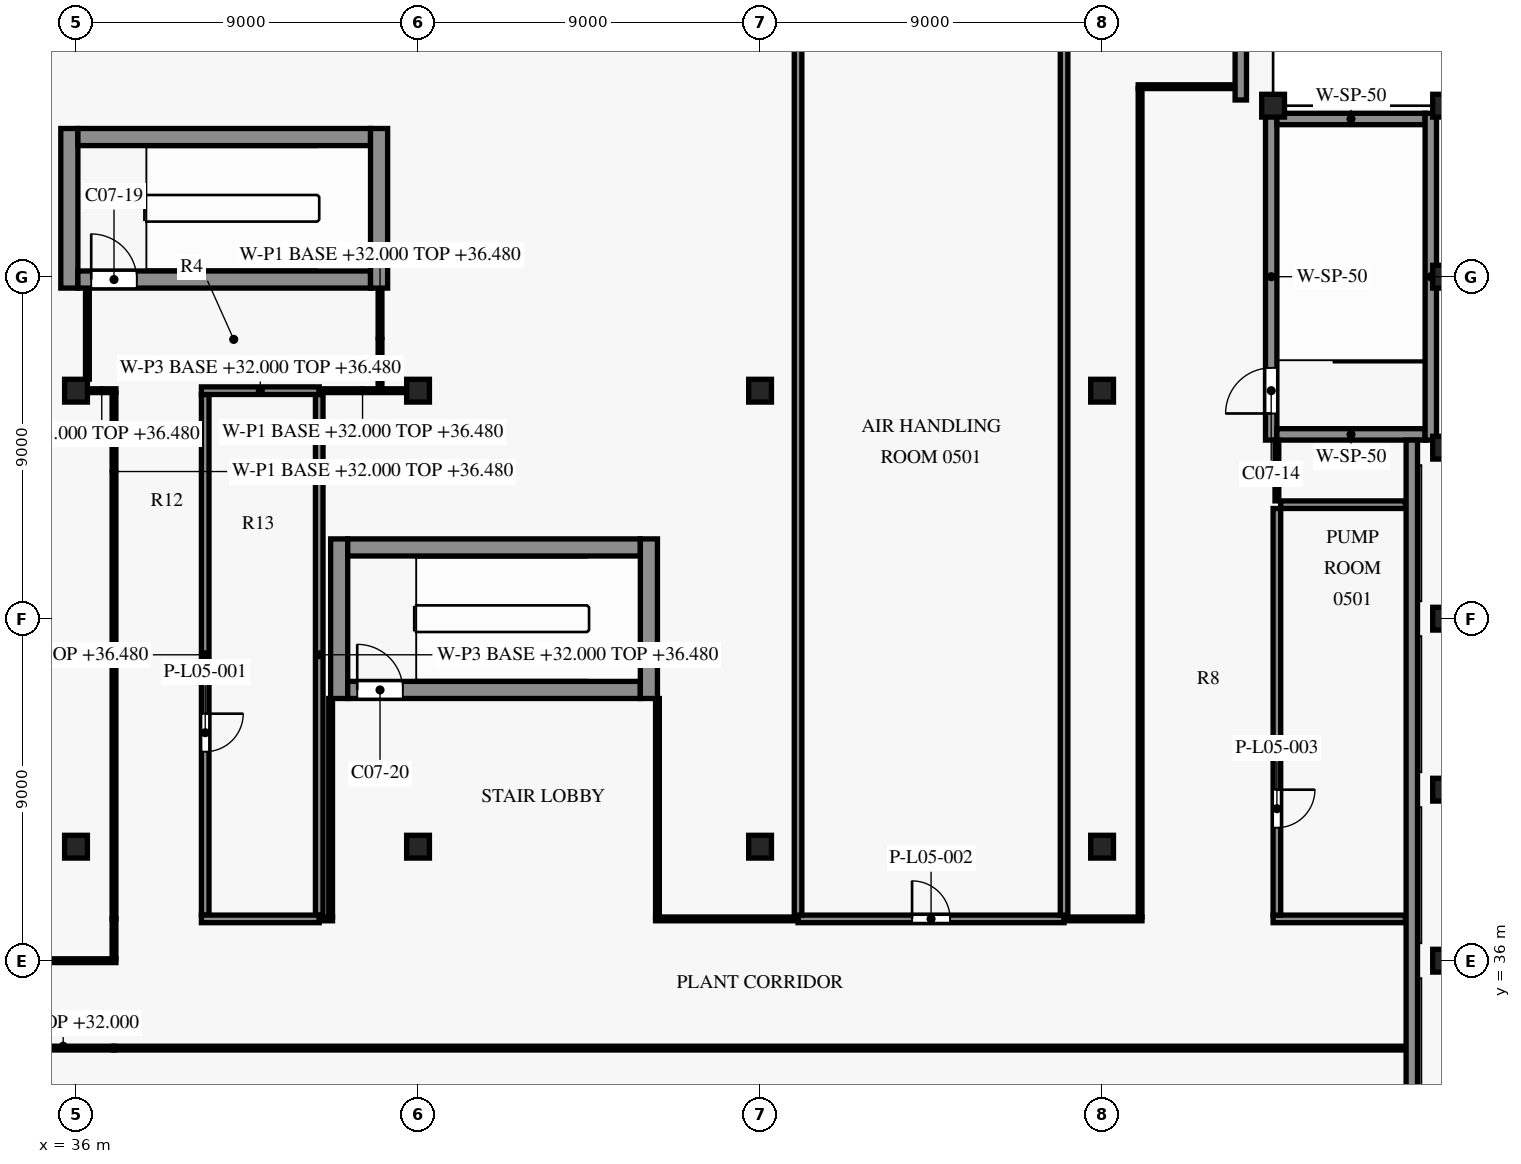
"""IFC4 building model, lengths in metres.
Left out: names, types, materials, properties, quantities, classifications, styles, units other than length and angle.
Written with IfcOpenShell. Run it as: python <this file> out.ifc"""

import sys

from ifc_helpers import new_model, si_unit, direction, frame, frame_2d, origin, origin_2d, place, context, subcontext, project, spatial, rectangle, hollow_rectangle, extrude, element, fill, save


model = new_model("IFC4")
c1 = context("Model", 3, precision=1e-05, world=origin(), true_north=direction((0.0, 1.0)))
c2 = subcontext(c1, "Body", "Model", "MODEL_VIEW")
j1 = project(units=[si_unit("LENGTHUNIT", "METRE"), si_unit("PLANEANGLEUNIT", "RADIAN")], contexts=[c1])
p1 = place(None, origin())
s1 = spatial("IfcSite", under=j1, at=p1, CompositionType="ELEMENT")
p2 = place(p1, origin())
s2 = spatial("IfcBuilding", under=s1, at=p2, CompositionType="ELEMENT")
p3 = place(p2, frame((0.0, 0.0, 32.0)))
s3 = spatial("IfcBuildingStorey", under=s2, at=p3, CompositionType="ELEMENT", Elevation=32.0)
for number, where, z_axis, x_axis in (
    (1, (36.0, 39.0, 0.0), (0.0, 0.0, 1.0), (1.0, 0.0, 0.0)),
    (2, (36.0, 51.0, 0.0), (0.0, 0.0, 1.0), (1.0, 0.0, 0.0)),
    (3, (45.0, 39.0, 0.0), (0.0, 0.0, 1.0), (1.0, 0.0, 0.0)),
    (4, (45.0, 51.0, 0.0), (0.0, 0.0, 1.0), (1.0, 0.0, 0.0)),
    (5, (54.0, 39.0, 0.0), (0.0, 0.0, 1.0), (1.0, 0.0, 0.0)),
    (6, (54.0, 51.0, 0.0), (0.0, 0.0, 1.0), (1.0, 0.0, 0.0)),
    (7, (63.0, 39.0, 0.0), (0.0, 0.0, 1.0), (1.0, 0.0, 0.0)),
    (8, (63.0, 51.0, 0.0), (0.0, 0.0, 1.0), (1.0, 0.0, 0.0)),
    (9, (67.5, 58.5, 0.0), (0.0, 0.0, 1.0), (1.0, 0.0, 0.0)),
    (10, (72.0, 36.0, 0.0), (0.0, 0.0, 1.0), (1.0, 0.0, 0.0)),
    (11, (72.0, 40.5, 0.0), (0.0, 0.0, 1.0), (1.0, 0.0, 0.0)),
    (12, (72.0, 45.0, 0.0), (0.0, 0.0, 1.0), (1.0, 0.0, 0.0)),
    (13, (72.0, 49.5, 0.0), (0.0, 0.0, 1.0), (1.0, 0.0, 0.0)),
    (14, (72.0, 54.0, 0.0), (0.0, 0.0, 1.0), (1.0, 0.0, 0.0)),
    (15, (72.0, 58.5, 0.0), (0.0, 0.0, 1.0), (1.0, 0.0, 0.0)),
):
    element("IfcColumn", number, at=place(p3, frame(where, z_axis=z_axis, x_axis=x_axis)), inside=s3, PredefinedType="COLUMN", context=c2, shape_type="SweptSolid", body=[
        extrude(hollow_rectangle(XDim=0.6, YDim=0.6, WallThickness=0.03, InnerFilletRadius=0.03, OuterFilletRadius=0.06, at=origin_2d()), origin(), (0.0, 0.0, 1.0), 5.5),
    ])
p4 = place(p3, frame((71.15, 49.7, 0.0), z_axis=(0.0, 0.0, 1.0), x_axis=(0.0, -1.0, 0.0)))
e16 = element("IfcWall", 16, at=p4, inside=s3, PredefinedType="SOLIDWALL", context=c2, shape_type="SweptSolid", body=[
    extrude(rectangle(XDim=17.202, YDim=0.3, at=frame_2d((8.601, 0.0))), origin(), (0.0, 0.0, 1.0), 4.85),
])
p5 = place(p3, frame((66.65, 62.816, 0.0), z_axis=(0.0, 0.0, 1.0), x_axis=(0.0, -1.0, 0.0)))
e17 = element("IfcWall", 17, at=p5, inside=s3, PredefinedType="SOLIDWALL", context=c2, shape_type="SweptSolid", body=[
    extrude(rectangle(XDim=4.167, YDim=0.3, at=frame_2d((2.083, 0.0))), origin(), (0.0, 0.0, 1.0), 4.85),
])
p6 = place(p3, frame((43.15, 43.125, 0.0), z_axis=(0.0, 0.0, 1.0), x_axis=(1.0, 0.0, 0.0)))
e18 = element("IfcWall", 18, at=p6, inside=s3, PredefinedType="SHEAR", context=c2, shape_type="SweptSolid", body=[
    extrude(rectangle(XDim=7.7, YDim=0.45, at=frame_2d((3.85, 0.0))), origin(), (0.0, 0.0, 1.0), 5.2),
])
p7 = place(p6, frame((0.25, 0.0, 0.0)))
e19 = element("IfcOpeningElement", 19, at=p7, cuts=e18, PredefinedType="OPENING", context=c2, shape_type="SweptSolid", body=[
    extrude(rectangle(XDim=1.2, YDim=2.2, at=frame_2d((0.6, 1.1))), frame((0.0, 0.235, 0.0), z_axis=(0.0, -1.0, 0.0), x_axis=(1.0, 0.0, 0.0)), (0.0, 0.0, 1.0), 0.47),
])
p8 = place(p3, frame((43.15, 46.875, 0.0), z_axis=(0.0, 0.0, 1.0), x_axis=(1.0, 0.0, 0.0)))
e20 = element("IfcWall", 20, at=p8, inside=s3, PredefinedType="SHEAR", context=c2, shape_type="SweptSolid", body=[
    extrude(rectangle(XDim=7.7, YDim=0.45, at=frame_2d((3.85, 0.0))), origin(), (0.0, 0.0, 1.0), 5.2),
])
p9 = place(p3, frame((67.6, 49.85, 0.0), z_axis=(0.0, 0.0, 1.0), x_axis=(1.0, 0.0, 0.0)))
e21 = element("IfcWall", 21, at=p9, inside=s3, PredefinedType="SHEAR", context=c2, shape_type="SweptSolid", body=[
    extrude(rectangle(XDim=3.9, YDim=0.3, at=frame_2d((1.95, 0.0))), origin(), (0.0, 0.0, 1.0), 5.2),
])
p10 = place(p3, frame((36.05, 53.925, 0.0), z_axis=(0.0, 0.0, 1.0), x_axis=(1.0, 0.0, 0.0)))
e22 = element("IfcWall", 22, at=p10, inside=s3, PredefinedType="SHEAR", context=c2, shape_type="SweptSolid", body=[
    extrude(rectangle(XDim=7.7, YDim=0.45, at=frame_2d((3.85, 0.0))), origin(), (0.0, 0.0, 1.0), 5.2),
])
p11 = place(p10, frame((0.35, 0.0, 0.0)))
e23 = element("IfcOpeningElement", 23, at=p11, cuts=e22, PredefinedType="OPENING", context=c2, shape_type="SweptSolid", body=[
    extrude(rectangle(XDim=1.2, YDim=2.2, at=frame_2d((0.6, 1.1))), frame((0.0, 0.235, 0.0), z_axis=(0.0, -1.0, 0.0), x_axis=(1.0, 0.0, 0.0)), (0.0, 0.0, 1.0), 0.47),
])
p12 = place(p3, frame((36.05, 57.675, 0.0), z_axis=(0.0, 0.0, 1.0), x_axis=(1.0, 0.0, 0.0)))
e24 = element("IfcWall", 24, at=p12, inside=s3, PredefinedType="SHEAR", context=c2, shape_type="SweptSolid", body=[
    extrude(rectangle(XDim=7.7, YDim=0.45, at=frame_2d((3.85, 0.0))), origin(), (0.0, 0.0, 1.0), 5.2),
])
p13 = place(p3, frame((67.6, 58.15, 0.0), z_axis=(0.0, 0.0, 1.0), x_axis=(1.0, 0.0, 0.0)))
e25 = element("IfcWall", 25, at=p13, inside=s3, PredefinedType="SHEAR", context=c2, shape_type="SweptSolid", body=[
    extrude(rectangle(XDim=3.9, YDim=0.3, at=frame_2d((1.95, 0.0))), origin(), (0.0, 0.0, 1.0), 5.2),
])
p14 = place(p3, frame((35.825, 53.7, 0.0), z_axis=(0.0, 0.0, 1.0), x_axis=(0.0, 1.0, 0.0)))
e26 = element("IfcWall", 26, at=p14, inside=s3, PredefinedType="SHEAR", context=c2, shape_type="SweptSolid", body=[
    extrude(rectangle(XDim=4.2, YDim=0.45, at=frame_2d((2.1, 0.0))), origin(), (0.0, 0.0, 1.0), 5.2),
])
p15 = place(p3, frame((42.925, 42.9, 0.0), z_axis=(0.0, 0.0, 1.0), x_axis=(0.0, 1.0, 0.0)))
e27 = element("IfcWall", 27, at=p15, inside=s3, PredefinedType="SHEAR", context=c2, shape_type="SweptSolid", body=[
    extrude(rectangle(XDim=4.2, YDim=0.45, at=frame_2d((2.1, 0.0))), origin(), (0.0, 0.0, 1.0), 5.2),
])
p16 = place(p3, frame((43.975, 53.7, 0.0), z_axis=(0.0, 0.0, 1.0), x_axis=(0.0, 1.0, 0.0)))
e28 = element("IfcWall", 28, at=p16, inside=s3, PredefinedType="SHEAR", context=c2, shape_type="SweptSolid", body=[
    extrude(rectangle(XDim=4.2, YDim=0.45, at=frame_2d((2.1, 0.0))), origin(), (0.0, 0.0, 1.0), 5.2),
])
p17 = place(p3, frame((51.075, 42.9, 0.0), z_axis=(0.0, 0.0, 1.0), x_axis=(0.0, 1.0, 0.0)))
e29 = element("IfcWall", 29, at=p17, inside=s3, PredefinedType="SHEAR", context=c2, shape_type="SweptSolid", body=[
    extrude(rectangle(XDim=4.2, YDim=0.45, at=frame_2d((2.1, 0.0))), origin(), (0.0, 0.0, 1.0), 5.2),
])
p18 = place(p3, frame((67.45, 49.7, 0.0), z_axis=(0.0, 0.0, 1.0), x_axis=(0.0, 1.0, 0.0)))
e30 = element("IfcWall", 30, at=p18, inside=s3, PredefinedType="SHEAR", context=c2, shape_type="SweptSolid", body=[
    extrude(rectangle(XDim=8.6, YDim=0.3, at=frame_2d((4.3, 0.0))), origin(), (0.0, 0.0, 1.0), 5.2),
])
p19 = place(p18, frame((0.7, 0.0, 0.0)))
e31 = element("IfcOpeningElement", 31, at=p19, cuts=e30, PredefinedType="OPENING", context=c2, shape_type="SweptSolid", body=[
    extrude(rectangle(XDim=1.2, YDim=2.2, at=frame_2d((0.6, 1.1))), frame((0.0, 0.16, 0.0), z_axis=(0.0, -1.0, 0.0), x_axis=(1.0, 0.0, 0.0)), (0.0, 0.0, 1.0), 0.32),
])
p20 = place(p3, frame((71.65, 49.7, 0.0), z_axis=(0.0, 0.0, 1.0), x_axis=(0.0, 1.0, 0.0)))
e32 = element("IfcWall", 32, at=p20, inside=s3, PredefinedType="SHEAR", context=c2, shape_type="SweptSolid", body=[
    extrude(rectangle(XDim=8.6, YDim=0.3, at=frame_2d((4.3, 0.0))), origin(), (0.0, 0.0, 1.0), 5.2),
])
p21 = place(p3, frame((37.0, 33.7, 0.0), z_axis=(0.0, 0.0, 1.0), x_axis=(-1.0, 0.0, 0.0)))
e33 = element("IfcWall", 33, at=p21, inside=s3, PredefinedType="PARTITIONING", context=c2, shape_type="SweptSolid", body=[
    extrude(rectangle(XDim=35.05, YDim=0.1, at=frame_2d((17.525, 0.0))), origin(), (0.0, 0.0, 1.0), 5.18),
])
p22 = place(p3, frame((70.98, 33.7, 0.0), z_axis=(0.0, 0.0, 1.0), x_axis=(-1.0, 0.0, 0.0)))
e34 = element("IfcWall", 34, at=p22, inside=s3, PredefinedType="PARTITIONING", context=c2, shape_type="SweptSolid", body=[
    extrude(rectangle(XDim=33.98, YDim=0.1, at=frame_2d((16.99, 0.0))), origin(), (0.0, 0.0, 1.0), 5.18),
])
p23 = place(p3, frame((27.15, 36.0, 0.0), z_axis=(0.0, 0.0, 1.0), x_axis=(1.0, 0.0, 0.0)))
e35 = element("IfcWall", 35, at=p23, inside=s3, PredefinedType="PARTITIONING", context=c2, shape_type="SweptSolid", body=[
    extrude(rectangle(XDim=9.9, YDim=0.1, at=frame_2d((4.95, 0.0))), origin(), (0.0, 0.0, 1.0), 5.18),
])
p24 = place(p3, frame((37.0, 36.05, 0.0), z_axis=(0.0, 0.0, 1.0), x_axis=(0.0, 1.0, 0.0)))
e36 = element("IfcWall", 36, at=p24, inside=s3, PredefinedType="PARTITIONING", context=c2, shape_type="SweptSolid", body=[
    extrude(rectangle(XDim=1.05, YDim=0.1, at=frame_2d((0.525, 0.0))), origin(), (0.0, 0.0, 1.0), 5.18),
])
p25 = place(p3, frame((37.0, 37.1, 0.0), z_axis=(0.0, 0.0, 1.0), x_axis=(0.0, 1.0, 0.0)))
e37 = element("IfcWall", 37, at=p25, inside=s3, PredefinedType="PARTITIONING", context=c2, shape_type="SweptSolid", body=[
    extrude(rectangle(XDim=13.85, YDim=0.1, at=frame_2d((6.925, 0.0))), origin(), (0.0, 0.0, 1.0), 4.48),
])
p26 = place(p3, frame((39.3, 37.1, 0.0), z_axis=(0.0, 0.0, 1.0), x_axis=(1.0, 0.0, 0.0)))
e38 = element("IfcWall", 38, at=p26, inside=s3, PredefinedType="PARTITIONING", context=c2, shape_type="SweptSolid", body=[
    extrude(rectangle(XDim=3.1, YDim=0.2, at=frame_2d((1.55, 0.0))), origin(), (0.0, 0.0, 1.0), 5.18),
])
p27 = place(p3, frame((42.4, 37.1, 0.0), z_axis=(0.0, 0.0, 1.0), x_axis=(1.0, 0.0, 0.0)))
e39 = element("IfcWall", 39, at=p27, inside=s3, PredefinedType="PARTITIONING", context=c2, shape_type="SweptSolid", body=[
    extrude(rectangle(XDim=0.35, YDim=0.1, at=frame_2d((0.175, 0.0))), origin(), (0.0, 0.0, 1.0), 5.18),
])
p28 = place(p3, frame((51.25, 37.1, 0.0), z_axis=(0.0, 0.0, 1.0), x_axis=(1.0, 0.0, 0.0)))
e40 = element("IfcWall", 40, at=p28, inside=s3, PredefinedType="PARTITIONING", context=c2, shape_type="SweptSolid", body=[
    extrude(rectangle(XDim=3.75, YDim=0.1, at=frame_2d((1.875, 0.0))), origin(), (0.0, 0.0, 1.0), 5.18),
])
p29 = place(p3, frame((55.0, 37.1, 0.0), z_axis=(0.0, 0.0, 1.0), x_axis=(1.0, 0.0, 0.0)))
e41 = element("IfcWall", 41, at=p29, inside=s3, PredefinedType="PARTITIONING", context=c2, shape_type="SweptSolid", body=[
    extrude(rectangle(XDim=7.0, YDim=0.2, at=frame_2d((3.5, 0.0))), origin(), (0.0, 0.0, 1.0), 5.18),
])
p30 = place(p29, frame((3.0, 0.0, 0.0)))
e42 = element("IfcOpeningElement", 42, at=p30, cuts=e41, PredefinedType="OPENING", context=c2, shape_type="SweptSolid", body=[
    extrude(rectangle(XDim=1.0, YDim=2.1, at=frame_2d((0.5, 1.05))), frame((0.0, 0.11, 0.0), z_axis=(0.0, -1.0, 0.0), x_axis=(1.0, 0.0, 0.0)), (0.0, 0.0, 1.0), 0.22),
])
p31 = place(p3, frame((62.0, 37.1, 0.0), z_axis=(0.0, 0.0, 1.0), x_axis=(1.0, 0.0, 0.0)))
e43 = element("IfcWall", 43, at=p31, inside=s3, PredefinedType="PARTITIONING", context=c2, shape_type="SweptSolid", body=[
    extrude(rectangle(XDim=2.05, YDim=0.1, at=frame_2d((1.025, 0.0))), origin(), (0.0, 0.0, 1.0), 5.18),
])
p32 = place(p3, frame((67.5, 37.1, 0.0), z_axis=(0.0, 0.0, 1.0), x_axis=(1.0, 0.0, 0.0)))
e44 = element("IfcWall", 44, at=p32, inside=s3, PredefinedType="PARTITIONING", context=c2, shape_type="SweptSolid", body=[
    extrude(rectangle(XDim=3.48, YDim=0.2, at=frame_2d((1.74, 0.0))), origin(), (0.0, 0.0, 1.0), 5.18),
])
p33 = place(p3, frame((42.7, 37.15, 0.0), z_axis=(0.0, 0.0, 1.0), x_axis=(0.0, 1.0, 0.0)))
e45 = element("IfcWall", 45, at=p33, inside=s3, PredefinedType="PARTITIONING", context=c2, shape_type="SweptSolid", body=[
    extrude(rectangle(XDim=5.75, YDim=0.1, at=frame_2d((2.875, 0.0))), origin(), (0.0, 0.0, 1.0), 5.18),
])
p34 = place(p3, frame((64.0, 37.15, 0.0), z_axis=(0.0, 0.0, 1.0), x_axis=(0.0, 1.0, 0.0)))
e46 = element("IfcWall", 46, at=p34, inside=s3, PredefinedType="PARTITIONING", context=c2, shape_type="SweptSolid", body=[
    extrude(rectangle(XDim=21.8, YDim=0.1, at=frame_2d((10.9, 0.0))), origin(), (0.0, 0.0, 1.0), 5.18),
])
p35 = place(p3, frame((55.0, 37.2, 0.0), z_axis=(0.0, 0.0, 1.0), x_axis=(0.0, 1.0, 0.0)))
e47 = element("IfcWall", 47, at=p35, inside=s3, PredefinedType="PARTITIONING", context=c2, shape_type="SweptSolid", body=[
    extrude(rectangle(XDim=24.875, YDim=0.2, at=frame_2d((12.438, 0.0))), origin(), (0.0, 0.0, 1.0), 5.18),
])
p36 = place(p3, frame((51.3, 42.9, 0.0), z_axis=(0.0, 0.0, 1.0), x_axis=(0.0, -1.0, 0.0)))
e48 = element("IfcWall", 48, at=p36, inside=s3, PredefinedType="PARTITIONING", context=c2, shape_type="SweptSolid", body=[
    extrude(rectangle(XDim=5.75, YDim=0.1, at=frame_2d((2.875, 0.0))), origin(), (0.0, 0.0, 1.0), 5.18),
])
p37 = place(p3, frame((67.6, 47.9, 0.0), z_axis=(0.0, 0.0, 1.0), x_axis=(0.0, -1.0, 0.0)))
e49 = element("IfcWall", 49, at=p37, inside=s3, PredefinedType="PARTITIONING", context=c2, shape_type="SweptSolid", body=[
    extrude(rectangle(XDim=10.7, YDim=0.2, at=frame_2d((5.35, 0.0))), origin(), (0.0, 0.0, 1.0), 5.18),
])
p38 = place(p37, frame((7.4, 0.0, 0.0)))
e50 = element("IfcOpeningElement", 50, at=p38, cuts=e49, PredefinedType="OPENING", context=c2, shape_type="SweptSolid", body=[
    extrude(rectangle(XDim=1.0, YDim=2.1, at=frame_2d((0.5, 1.05))), frame((0.0, 0.11, 0.0), z_axis=(0.0, -1.0, 0.0), x_axis=(1.0, 0.0, 0.0)), (0.0, 0.0, 1.0), 0.22),
])
p39 = place(p3, frame((67.7, 48.0, 0.0), z_axis=(0.0, 0.0, 1.0), x_axis=(1.0, 0.0, 0.0)))
e51 = element("IfcWall", 51, at=p39, inside=s3, PredefinedType="PARTITIONING", context=c2, shape_type="SweptSolid", body=[
    extrude(rectangle(XDim=3.28, YDim=0.2, at=frame_2d((1.64, 0.0))), origin(), (0.0, 0.0, 1.0), 5.18),
])
p40 = place(p3, frame((67.6, 49.7, 0.0), z_axis=(0.0, 0.0, 1.0), x_axis=(0.0, -1.0, 0.0)))
e52 = element("IfcWall", 52, at=p40, inside=s3, PredefinedType="PARTITIONING", context=c2, shape_type="SweptSolid", body=[
    extrude(rectangle(XDim=1.6, YDim=0.1, at=frame_2d((0.8, 0.0))), origin(), (0.0, 0.0, 1.0), 5.18),
])
p41 = place(p3, frame((39.4, 50.9, 0.0), z_axis=(0.0, 0.0, 1.0), x_axis=(0.0, -1.0, 0.0)))
e53 = element("IfcWall", 53, at=p41, inside=s3, PredefinedType="PARTITIONING", context=c2, shape_type="SweptSolid", body=[
    extrude(rectangle(XDim=13.7, YDim=0.2, at=frame_2d((6.85, 0.0))), origin(), (0.0, 0.0, 1.0), 4.48),
])
p42 = place(p41, frame((8.4, 0.0, 0.0)))
e54 = element("IfcOpeningElement", 54, at=p42, cuts=e53, PredefinedType="OPENING", context=c2, shape_type="SweptSolid", body=[
    extrude(rectangle(XDim=1.0, YDim=2.1, at=frame_2d((0.5, 1.05))), frame((0.0, 0.11, 0.0), z_axis=(0.0, -1.0, 0.0), x_axis=(1.0, 0.0, 0.0)), (0.0, 0.0, 1.0), 0.22),
])
p43 = place(p3, frame((42.4, 50.9, 0.0), z_axis=(0.0, 0.0, 1.0), x_axis=(0.0, -1.0, 0.0)))
e55 = element("IfcWall", 55, at=p43, inside=s3, PredefinedType="PARTITIONING", context=c2, shape_type="SweptSolid", body=[
    extrude(rectangle(XDim=13.7, YDim=0.2, at=frame_2d((6.85, 0.0))), origin(), (0.0, 0.0, 1.0), 4.48),
])
p44 = place(p3, frame((37.05, 51.0, 0.0), z_axis=(0.0, 0.0, 1.0), x_axis=(-1.0, 0.0, 0.0)))
e56 = element("IfcWall", 56, at=p44, inside=s3, PredefinedType="PARTITIONING", context=c2, shape_type="SweptSolid", body=[
    extrude(rectangle(XDim=0.745, YDim=0.1, at=frame_2d((0.373, 0.0))), origin(), (0.0, 0.0, 1.0), 4.48),
])
p45 = place(p3, frame((42.4, 51.0, 0.0), z_axis=(0.0, 0.0, 1.0), x_axis=(-1.0, 0.0, 0.0)))
e57 = element("IfcWall", 57, at=p45, inside=s3, PredefinedType="PARTITIONING", context=c2, shape_type="SweptSolid", body=[
    extrude(rectangle(XDim=3.1, YDim=0.2, at=frame_2d((1.55, 0.0))), origin(), (0.0, 0.0, 1.0), 4.48),
])
p46 = place(p3, frame((44.68, 51.0, 0.0), z_axis=(0.0, 0.0, 1.0), x_axis=(-1.0, 0.0, 0.0)))
e58 = element("IfcWall", 58, at=p46, inside=s3, PredefinedType="PARTITIONING", context=c2, shape_type="SweptSolid", body=[
    extrude(rectangle(XDim=2.28, YDim=0.1, at=frame_2d((1.14, 0.0))), origin(), (0.0, 0.0, 1.0), 4.48),
])
p47 = place(p3, frame((36.3, 51.305, 0.0), z_axis=(0.0, 0.0, 1.0), x_axis=(0.0, 1.0, 0.0)))
e59 = element("IfcWall", 59, at=p47, inside=s3, PredefinedType="PARTITIONING", context=c2, shape_type="SweptSolid", body=[
    extrude(rectangle(XDim=2.395, YDim=0.1, at=frame_2d((1.198, 0.0))), origin(), (0.0, 0.0, 1.0), 5.18),
])
p48 = place(p3, frame((44.0, 53.7, 0.0), z_axis=(0.0, 0.0, 1.0), x_axis=(0.0, -1.0, 0.0)))
e60 = element("IfcWall", 60, at=p48, inside=s3, PredefinedType="PARTITIONING", context=c2, shape_type="SweptSolid", body=[
    extrude(rectangle(XDim=2.65, YDim=0.1, at=frame_2d((1.325, 0.0))), origin(), (0.0, 0.0, 1.0), 4.48),
])
p49 = place(p3, frame((63.95, 59.0, 0.0), z_axis=(0.0, 0.0, 1.0), x_axis=(1.0, 0.0, 0.0)))
e61 = element("IfcWall", 61, at=p49, inside=s3, PredefinedType="PARTITIONING", context=c2, shape_type="SweptSolid", body=[
    extrude(rectangle(XDim=2.53, YDim=0.1, at=frame_2d((1.265, 0.0))), origin(), (0.0, 0.0, 1.0), 5.18),
])
p50 = place(p3, frame((62.0, 62.775, 0.0), z_axis=(0.0, 0.0, 1.0), x_axis=(0.0, -1.0, 0.0)))
e62 = element("IfcWall", 62, at=p50, inside=s3, PredefinedType="PARTITIONING", context=c2, shape_type="SweptSolid", body=[
    extrude(rectangle(XDim=25.575, YDim=0.2, at=frame_2d((12.788, 0.0))), origin(), (0.0, 0.0, 1.0), 5.18),
])
p51 = place(p19, origin())
e63 = element("IfcDoor", 63, at=p51, inside=s3, OperationType="SINGLE_SWING_RIGHT", PredefinedType="DOOR", context=c2, shape_type="SweptSolid", body=[
    extrude(rectangle(XDim=1.2, YDim=2.2, at=frame_2d((0.6, 1.1))), frame((0.0, 0.025, 0.0), z_axis=(0.0, -1.0, 0.0), x_axis=(1.0, 0.0, 0.0)), (0.0, 0.0, 1.0), 0.05),
])
fill(e31, e63)
p52 = place(p11, origin())
e64 = element("IfcDoor", 64, at=p52, inside=s3, OperationType="SINGLE_SWING_LEFT", PredefinedType="DOOR", context=c2, shape_type="SweptSolid", body=[
    extrude(rectangle(XDim=1.2, YDim=2.2, at=frame_2d((0.6, 1.1))), frame((0.0, 0.025, 0.0), z_axis=(0.0, -1.0, 0.0), x_axis=(1.0, 0.0, 0.0)), (0.0, 0.0, 1.0), 0.05),
])
fill(e23, e64)
p53 = place(p7, origin())
e65 = element("IfcDoor", 65, at=p53, inside=s3, OperationType="SINGLE_SWING_RIGHT", PredefinedType="DOOR", context=c2, shape_type="SweptSolid", body=[
    extrude(rectangle(XDim=1.2, YDim=2.2, at=frame_2d((0.6, 1.1))), frame((0.0, 0.025, 0.0), z_axis=(0.0, -1.0, 0.0), x_axis=(1.0, 0.0, 0.0)), (0.0, 0.0, 1.0), 0.05),
])
fill(e19, e65)
p54 = place(p42, origin())
e66 = element("IfcDoor", 66, at=p54, inside=s3, OperationType="SINGLE_SWING_LEFT", PredefinedType="DOOR", context=c2, shape_type="SweptSolid", body=[
    extrude(rectangle(XDim=1.0, YDim=2.1, at=frame_2d((0.5, 1.05))), frame((0.0, 0.025, 0.0), z_axis=(0.0, -1.0, 0.0), x_axis=(1.0, 0.0, 0.0)), (0.0, 0.0, 1.0), 0.05),
])
fill(e54, e66)
p55 = place(p30, origin())
e67 = element("IfcDoor", 67, at=p55, inside=s3, OperationType="SINGLE_SWING_LEFT", PredefinedType="DOOR", context=c2, shape_type="SweptSolid", body=[
    extrude(rectangle(XDim=1.0, YDim=2.1, at=frame_2d((0.5, 1.05))), frame((0.0, 0.025, 0.0), z_axis=(0.0, -1.0, 0.0), x_axis=(1.0, 0.0, 0.0)), (0.0, 0.0, 1.0), 0.05),
])
fill(e42, e67)
p56 = place(p38, origin())
e68 = element("IfcDoor", 68, at=p56, inside=s3, OperationType="SINGLE_SWING_LEFT", PredefinedType="DOOR", context=c2, shape_type="SweptSolid", body=[
    extrude(rectangle(XDim=1.0, YDim=2.1, at=frame_2d((0.5, 1.05))), frame((0.0, 0.025, 0.0), z_axis=(0.0, -1.0, 0.0), x_axis=(1.0, 0.0, 0.0)), (0.0, 0.0, 1.0), 0.05),
])
fill(e50, e68)
save(model, sys.argv[1])
